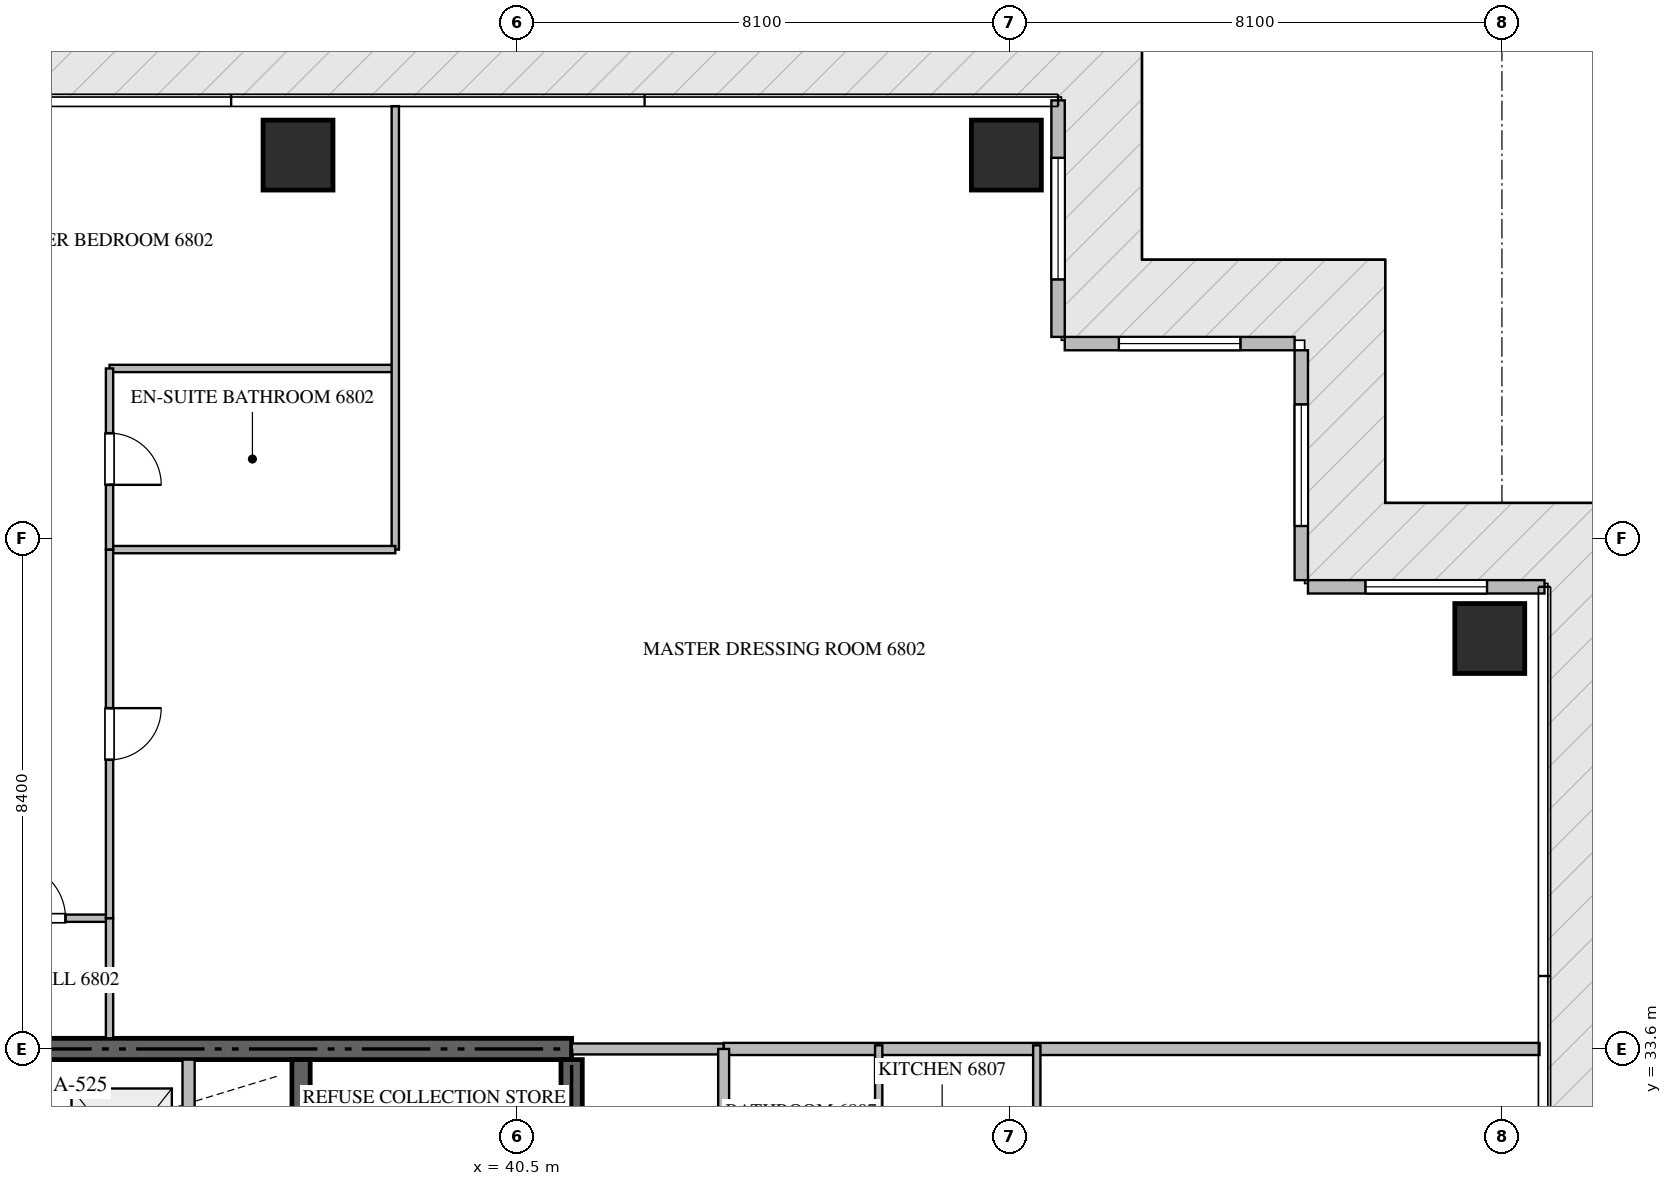
"""IFC4 building model, lengths in metres.
Left out: names, types, materials, properties, quantities, classifications, styles, units other than length and angle.
Written with IfcOpenShell. Run it as: python <this file> out.ifc"""

import sys

from ifc_helpers import new_model, si_unit, direction, frame, frame_2d, origin, origin_2d, place, context, subcontext, project, spatial, rectangle, extrude, source, transform, mapped, element, fill, save


model = new_model("IFC4")
c1 = context("Model", 3, precision=1e-05, world=origin(), true_north=direction((0.0, 1.0)))
c2 = subcontext(c1, "Body", "Model", "MODEL_VIEW")
j1 = project(units=[si_unit("LENGTHUNIT", "METRE"), si_unit("PLANEANGLEUNIT", "RADIAN")], contexts=[c1])
p1 = place(None, origin())
s1 = spatial("IfcSite", under=j1, at=p1, CompositionType="ELEMENT")
p2 = place(p1, origin())
s2 = spatial("IfcBuilding", under=s1, at=p2, CompositionType="ELEMENT")
p3 = place(p2, frame((0.0, 0.0, 272.05)))
s3 = spatial("IfcBuildingStorey", under=s2, at=p3, CompositionType="ELEMENT", Elevation=272.05)
p4 = place(p3, frame((41.4, 33.6, -0.26), z_axis=(0.0, 0.0, 1.0), x_axis=(-1.0, 0.0, 0.0)))
e1 = element("IfcWall", 1, at=p4, inside=s3, PredefinedType="SHEAR", context=c2, shape_type="SweptSolid", body=[
    extrude(rectangle(XDim=18.0, YDim=0.35, at=frame_2d((9.0, 0.0))), origin(), (0.0, 0.0, 1.0), 3.848),
])
p5 = place(p3, frame((41.4, 27.75, -0.26), z_axis=(0.0, 0.0, 1.0), x_axis=(0.0, 1.0, 0.0)))
e2 = element("IfcWall", 2, at=p5, inside=s3, PredefinedType="SHEAR", context=c2, shape_type="SweptSolid", body=[
    extrude(rectangle(XDim=5.675, YDim=0.35, at=frame_2d((2.837, 0.0))), origin(), (0.0, 0.0, 1.0), 3.848),
])
p6 = place(p3, frame((36.95, 27.05, -0.26), z_axis=(0.0, 0.0, 1.0), x_axis=(0.0, 1.0, 0.0)))
e3 = element("IfcWall", 3, at=p6, inside=s3, PredefinedType="SHEAR", context=c2, shape_type="SweptSolid", body=[
    extrude(rectangle(XDim=6.375, YDim=0.3, at=frame_2d((3.188, 0.0))), origin(), (0.0, 0.0, 1.0), 3.848),
])
m1 = source(origin(), c2, "Body", "SweptSolid", [
    extrude(rectangle(XDim=1.15, YDim=1.15, at=origin_2d()), origin(), (0.0, 0.0, 1.0), 3.85),
])
for number, where, z_axis, x_axis in (
    (4, (36.9, 48.3, -0.26), (0.0, 0.0, 1.0), (1.0, 0.0, 0.0)),
    (5, (48.55, 48.3, -0.26), (0.0, 0.0, 1.0), (1.0, 0.0, 0.0)),
    (6, (56.5, 40.35, -0.26), (0.0, 0.0, 1.0), (1.0, 0.0, 0.0)),
):
    element("IfcColumn", number, at=place(p3, frame(where, z_axis=z_axis, x_axis=x_axis)), inside=s3, PredefinedType="COLUMN", context=c2, shape_type="MappedRepresentation", body=[
        mapped(m1, transform((0.0, 0.0, 0.0), scale=1.0)),
    ])
p7 = place(p3, frame((57.4, 41.2, 0.0), z_axis=(0.0, 0.0, 1.0), x_axis=(-1.0, 0.0, 0.0)))
e7 = element("IfcWall", 7, at=p7, inside=s3, PredefinedType="ELEMENTEDWALL", context=c2, shape_type="SweptSolid", body=[
    extrude(rectangle(XDim=3.89, YDim=0.22, at=frame_2d((1.945, 0.0))), origin(), (0.0, 0.0, 1.0), 3.575),
])
p8 = place(p7, frame((0.945, 0.0, 0.65)))
e8 = element("IfcOpeningElement", 8, at=p8, cuts=e7, PredefinedType="OPENING", context=c2, shape_type="SweptSolid", body=[
    extrude(rectangle(XDim=2.0, YDim=2.2, at=frame_2d((1.0, 1.1))), frame((0.0, 0.12, 0.0), z_axis=(0.0, -1.0, 0.0), x_axis=(1.0, 0.0, 0.0)), (0.0, 0.0, 1.0), 0.24),
])
p9 = place(p3, frame((53.4, 41.31, 0.0), z_axis=(0.0, 0.0, 1.0), x_axis=(0.0, 1.0, 0.0)))
e9 = element("IfcWall", 9, at=p9, inside=s3, PredefinedType="ELEMENTEDWALL", context=c2, shape_type="SweptSolid", body=[
    extrude(rectangle(XDim=3.78, YDim=0.22, at=frame_2d((1.89, 0.0))), origin(), (0.0, 0.0, 1.0), 3.575),
])
p10 = place(p9, frame((0.89, 0.0, 0.65)))
e10 = element("IfcOpeningElement", 10, at=p10, cuts=e9, PredefinedType="OPENING", context=c2, shape_type="SweptSolid", body=[
    extrude(rectangle(XDim=2.0, YDim=2.2, at=frame_2d((1.0, 1.1))), frame((0.0, 0.12, 0.0), z_axis=(0.0, -1.0, 0.0), x_axis=(1.0, 0.0, 0.0)), (0.0, 0.0, 1.0), 0.24),
])
p11 = place(p3, frame((53.29, 45.2, 0.0), z_axis=(0.0, 0.0, 1.0), x_axis=(-1.0, 0.0, 0.0)))
e11 = element("IfcWall", 11, at=p11, inside=s3, PredefinedType="ELEMENTEDWALL", context=c2, shape_type="SweptSolid", body=[
    extrude(rectangle(XDim=3.78, YDim=0.22, at=frame_2d((1.89, 0.0))), origin(), (0.0, 0.0, 1.0), 3.575),
])
p12 = place(p11, frame((0.89, 0.0, 0.65)))
e12 = element("IfcOpeningElement", 12, at=p12, cuts=e11, PredefinedType="OPENING", context=c2, shape_type="SweptSolid", body=[
    extrude(rectangle(XDim=2.0, YDim=2.2, at=frame_2d((1.0, 1.1))), frame((0.0, 0.12, 0.0), z_axis=(0.0, -1.0, 0.0), x_axis=(1.0, 0.0, 0.0)), (0.0, 0.0, 1.0), 0.24),
])
p13 = place(p3, frame((49.4, 45.31, 0.0), z_axis=(0.0, 0.0, 1.0), x_axis=(0.0, 1.0, 0.0)))
e13 = element("IfcWall", 13, at=p13, inside=s3, PredefinedType="ELEMENTEDWALL", context=c2, shape_type="SweptSolid", body=[
    extrude(rectangle(XDim=3.89, YDim=0.22, at=frame_2d((1.945, 0.0))), origin(), (0.0, 0.0, 1.0), 3.575),
])
p14 = place(p13, frame((0.945, 0.0, 0.65)))
e14 = element("IfcOpeningElement", 14, at=p14, cuts=e13, PredefinedType="OPENING", context=c2, shape_type="SweptSolid", body=[
    extrude(rectangle(XDim=2.0, YDim=2.2, at=frame_2d((1.0, 1.1))), frame((0.0, 0.12, 0.0), z_axis=(0.0, -1.0, 0.0), x_axis=(1.0, 0.0, 0.0)), (0.0, 0.0, 1.0), 0.24),
])
p15 = place(p3, frame((35.1, 30.75, 0.0), z_axis=(0.0, 0.0, 1.0), x_axis=(0.0, 1.0, 0.0)))
e15 = element("IfcWall", 15, at=p15, inside=s3, PredefinedType="STANDARD", context=c2, shape_type="SweptSolid", body=[
    extrude(rectangle(XDim=2.675, YDim=0.2, at=frame_2d((1.337, 0.0))), origin(), (0.0, 0.0, 1.0), 3.59),
])
p16 = place(p3, frame((43.9, 33.6, 0.0), z_axis=(0.0, 0.0, 1.0), x_axis=(1.0, 0.0, 0.0)))
e16 = element("IfcWall", 16, at=p16, inside=s3, PredefinedType="PARTITIONING", context=c2, shape_type="SweptSolid", body=[
    extrude(rectangle(XDim=13.418, YDim=0.2, at=frame_2d((6.709, 0.0))), origin(), (0.0, 0.0, 1.0), 3.59),
])
p17 = place(p3, frame((41.402, 33.6, 0.0), z_axis=(0.0, 0.0, 1.0), x_axis=(1.0, 0.0, 0.0)))
e17 = element("IfcWall", 17, at=p17, inside=s3, PredefinedType="PARTITIONING", context=c2, shape_type="SweptSolid", body=[
    extrude(rectangle(XDim=2.496, YDim=0.18, at=frame_2d((1.248, 0.0))), origin(), (0.0, 0.0, 1.0), 3.59),
])
p18 = place(p3, frame((43.9, 16.8, 0.0), z_axis=(0.0, 0.0, 1.0), x_axis=(0.0, 1.0, 0.0)))
e18 = element("IfcWall", 18, at=p18, inside=s3, PredefinedType="PARTITIONING", context=c2, shape_type="SweptSolid", body=[
    extrude(rectangle(XDim=16.8, YDim=0.18, at=frame_2d((8.4, 0.0))), origin(), (0.0, 0.0, 1.0), 3.59),
])
p19 = place(p18, frame((2.575, 0.0, 0.0)))
e19 = element("IfcOpeningElement", 19, at=p19, cuts=e18, PredefinedType="OPENING", context=c2, shape_type="SweptSolid", body=[
    extrude(rectangle(XDim=1.0, YDim=2.15, at=frame_2d((0.5, 1.075))), frame((0.0, 0.1, 0.0), z_axis=(0.0, -1.0, 0.0), x_axis=(1.0, 0.0, 0.0)), (0.0, 0.0, 1.0), 0.2),
])
p20 = place(p18, frame((10.997, 0.0, 0.0)))
e20 = element("IfcOpeningElement", 20, at=p20, cuts=e18, PredefinedType="OPENING", context=c2, shape_type="SweptSolid", body=[
    extrude(rectangle(XDim=1.0, YDim=2.15, at=frame_2d((0.5, 1.075))), frame((0.0, 0.1, 0.0), z_axis=(0.0, -1.0, 0.0), x_axis=(1.0, 0.0, 0.0)), (0.0, 0.0, 1.0), 0.2),
])
p21 = place(p3, frame((31.452, 35.75, 0.0), z_axis=(0.0, 0.0, 1.0), x_axis=(1.0, 0.0, 0.0)))
e21 = element("IfcWall", 21, at=p21, inside=s3, PredefinedType="PARTITIONING", context=c2, shape_type="SweptSolid", body=[
    extrude(rectangle(XDim=2.348, YDim=0.12, at=frame_2d((1.174, 0.0))), origin(), (0.0, 0.0, 1.0), 3.59),
])
p22 = place(p21, frame((0.724, 0.0, 0.0)))
e22 = element("IfcOpeningElement", 22, at=p22, cuts=e21, PredefinedType="OPENING", context=c2, shape_type="SweptSolid", body=[
    extrude(rectangle(XDim=0.9, YDim=2.1, at=frame_2d((0.45, 1.05))), frame((0.0, 0.07, 0.0), z_axis=(0.0, -1.0, 0.0), x_axis=(1.0, 0.0, 0.0)), (0.0, 0.0, 1.0), 0.14),
])
p23 = place(p3, frame((33.8, 44.791, 0.0), z_axis=(0.0, 0.0, 1.0), x_axis=(1.0, 0.0, 0.0)))
e23 = element("IfcWall", 23, at=p23, inside=s3, PredefinedType="PARTITIONING", context=c2, shape_type="SweptSolid", body=[
    extrude(rectangle(XDim=4.7, YDim=0.12, at=frame_2d((2.35, 0.0))), origin(), (0.0, 0.0, 1.0), 3.59),
])
p24 = place(p3, frame((38.5, 49.105, 0.0), z_axis=(0.0, 0.0, 1.0), x_axis=(0.0, -1.0, 0.0)))
e24 = element("IfcWall", 24, at=p24, inside=s3, PredefinedType="PARTITIONING", context=c2, shape_type="SweptSolid", body=[
    extrude(rectangle(XDim=7.293, YDim=0.12, at=frame_2d((3.646, 0.0))), origin(), (0.0, 0.0, 1.0), 3.59),
])
p25 = place(p3, frame((33.8, 41.812, 0.0), z_axis=(0.0, 0.0, 1.0), x_axis=(1.0, 0.0, 0.0)))
e25 = element("IfcWall", 25, at=p25, inside=s3, PredefinedType="PARTITIONING", context=c2, shape_type="SweptSolid", body=[
    extrude(rectangle(XDim=4.7, YDim=0.12, at=frame_2d((2.35, 0.0))), origin(), (0.0, 0.0, 1.0), 3.59),
])
p26 = place(p3, frame((33.8, 44.791, 0.0), z_axis=(0.0, 0.0, 1.0), x_axis=(0.0, -1.0, 0.0)))
e26 = element("IfcWall", 26, at=p26, inside=s3, PredefinedType="PARTITIONING", context=c2, shape_type="SweptSolid", body=[
    extrude(rectangle(XDim=2.979, YDim=0.12, at=frame_2d((1.49, 0.0))), origin(), (0.0, 0.0, 1.0), 3.59),
])
p27 = place(p26, frame((1.064, 0.0, 0.0)))
e27 = element("IfcOpeningElement", 27, at=p27, cuts=e26, PredefinedType="OPENING", context=c2, shape_type="SweptSolid", body=[
    extrude(rectangle(XDim=0.85, YDim=2.1, at=frame_2d((0.425, 1.05))), frame((0.0, 0.07, 0.0), z_axis=(0.0, -1.0, 0.0), x_axis=(1.0, 0.0, 0.0)), (0.0, 0.0, 1.0), 0.14),
])
p28 = place(p3, frame((33.8, 41.81, 0.0), z_axis=(0.0, 0.0, 1.0), x_axis=(0.0, -1.0, 0.0)))
e28 = element("IfcWall", 28, at=p28, inside=s3, PredefinedType="PARTITIONING", context=c2, shape_type="SweptSolid", body=[
    extrude(rectangle(XDim=6.06, YDim=0.12, at=frame_2d((3.03, 0.0))), origin(), (0.0, 0.0, 1.0), 3.59),
])
p29 = place(p28, frame((2.605, 0.0, 0.0)))
e29 = element("IfcOpeningElement", 29, at=p29, cuts=e28, PredefinedType="OPENING", context=c2, shape_type="SweptSolid", body=[
    extrude(rectangle(XDim=0.85, YDim=2.1, at=frame_2d((0.425, 1.05))), frame((0.0, 0.07, 0.0), z_axis=(0.0, -1.0, 0.0), x_axis=(1.0, 0.0, 0.0)), (0.0, 0.0, 1.0), 0.14),
])
p30 = place(p3, frame((33.8, 35.748, 0.0), z_axis=(0.0, 0.0, 1.0), x_axis=(0.0, -1.0, 0.0)))
e30 = element("IfcWall", 30, at=p30, inside=s3, PredefinedType="PARTITIONING", context=c2, shape_type="SweptSolid", body=[
    extrude(rectangle(XDim=1.973, YDim=0.12, at=frame_2d((0.987, 0.0))), origin(), (0.0, 0.0, 1.0), 3.59),
])
for number, where, z_axis, x_axis in (
    (31, (46.45, 31.0, 0.0), (0.0, 0.0, 1.0), (0.0, 1.0, 0.0)),
    (32, (49.05, 31.0, 0.0), (0.0, 0.0, 1.0), (0.0, 1.0, 0.0)),
):
    element("IfcWall", number, at=place(p3, frame(where, z_axis=z_axis, x_axis=x_axis)), inside=s3, PredefinedType="PARTITIONING", context=c2, shape_type="SweptSolid", body=[
        extrude(rectangle(XDim=2.66, YDim=0.12, at=frame_2d((1.33, 0.0))), origin(), (0.0, 0.0, 1.0), 3.59),
    ])
m2 = source(origin(), c2, "Body", "SweptSolid", [
    extrude(rectangle(XDim=2.0, YDim=2.2, at=frame_2d((1.0, 1.1))), frame((0.0, 0.03, 0.0), z_axis=(0.0, -1.0, 0.0), x_axis=(1.0, 0.0, 0.0)), (0.0, 0.0, 1.0), 0.06),
])
p31 = place(p8, origin())
e33 = element("IfcWindow", 33, at=p31, inside=s3, PartitioningType="SINGLE_PANEL", PredefinedType="WINDOW", context=c2, shape_type="MappedRepresentation", body=[
    mapped(m2, transform((0.0, 0.0, 0.0), scale=1.0)),
])
fill(e8, e33)
p32 = place(p10, origin())
e34 = element("IfcWindow", 34, at=p32, inside=s3, PartitioningType="SINGLE_PANEL", PredefinedType="WINDOW", context=c2, shape_type="MappedRepresentation", body=[
    mapped(m2, transform((0.0, 0.0, 0.0), scale=1.0)),
])
fill(e10, e34)
p33 = place(p12, origin())
e35 = element("IfcWindow", 35, at=p33, inside=s3, PartitioningType="SINGLE_PANEL", PredefinedType="WINDOW", context=c2, shape_type="MappedRepresentation", body=[
    mapped(m2, transform((0.0, 0.0, 0.0), scale=1.0)),
])
fill(e12, e35)
p34 = place(p14, origin())
e36 = element("IfcWindow", 36, at=p34, inside=s3, PartitioningType="SINGLE_PANEL", PredefinedType="WINDOW", context=c2, shape_type="MappedRepresentation", body=[
    mapped(m2, transform((0.0, 0.0, 0.0), scale=1.0)),
])
fill(e14, e36)
m3 = source(origin(), c2, "Body", "SweptSolid", [
    extrude(rectangle(XDim=0.9, YDim=2.1, at=frame_2d((0.45, 1.05))), frame((0.0, 0.025, 0.0), z_axis=(0.0, -1.0, 0.0), x_axis=(1.0, 0.0, 0.0)), (0.0, 0.0, 1.0), 0.05),
])
p35 = place(p22, origin())
e37 = element("IfcDoor", 37, at=p35, inside=s3, OperationType="SINGLE_SWING_LEFT", PredefinedType="DOOR", context=c2, shape_type="MappedRepresentation", body=[
    mapped(m3, transform((0.0, 0.0, 0.0), scale=1.0)),
])
fill(e22, e37)
m4 = source(origin(), c2, "Body", "SweptSolid", [
    extrude(rectangle(XDim=0.85, YDim=2.1, at=frame_2d((0.425, 1.05))), frame((0.0, 0.025, 0.0), z_axis=(0.0, -1.0, 0.0), x_axis=(1.0, 0.0, 0.0)), (0.0, 0.0, 1.0), 0.05),
])
p36 = place(p27, origin())
e38 = element("IfcDoor", 38, at=p36, inside=s3, OperationType="SINGLE_SWING_RIGHT", PredefinedType="DOOR", context=c2, shape_type="MappedRepresentation", body=[
    mapped(m4, transform((0.0, 0.0, 0.0), scale=1.0)),
])
fill(e27, e38)
p37 = place(p29, origin())
e39 = element("IfcDoor", 39, at=p37, inside=s3, OperationType="SINGLE_SWING_LEFT", PredefinedType="DOOR", context=c2, shape_type="MappedRepresentation", body=[
    mapped(m4, transform((0.0, 0.0, 0.0), scale=1.0)),
])
fill(e29, e39)
save(model, sys.argv[1])
